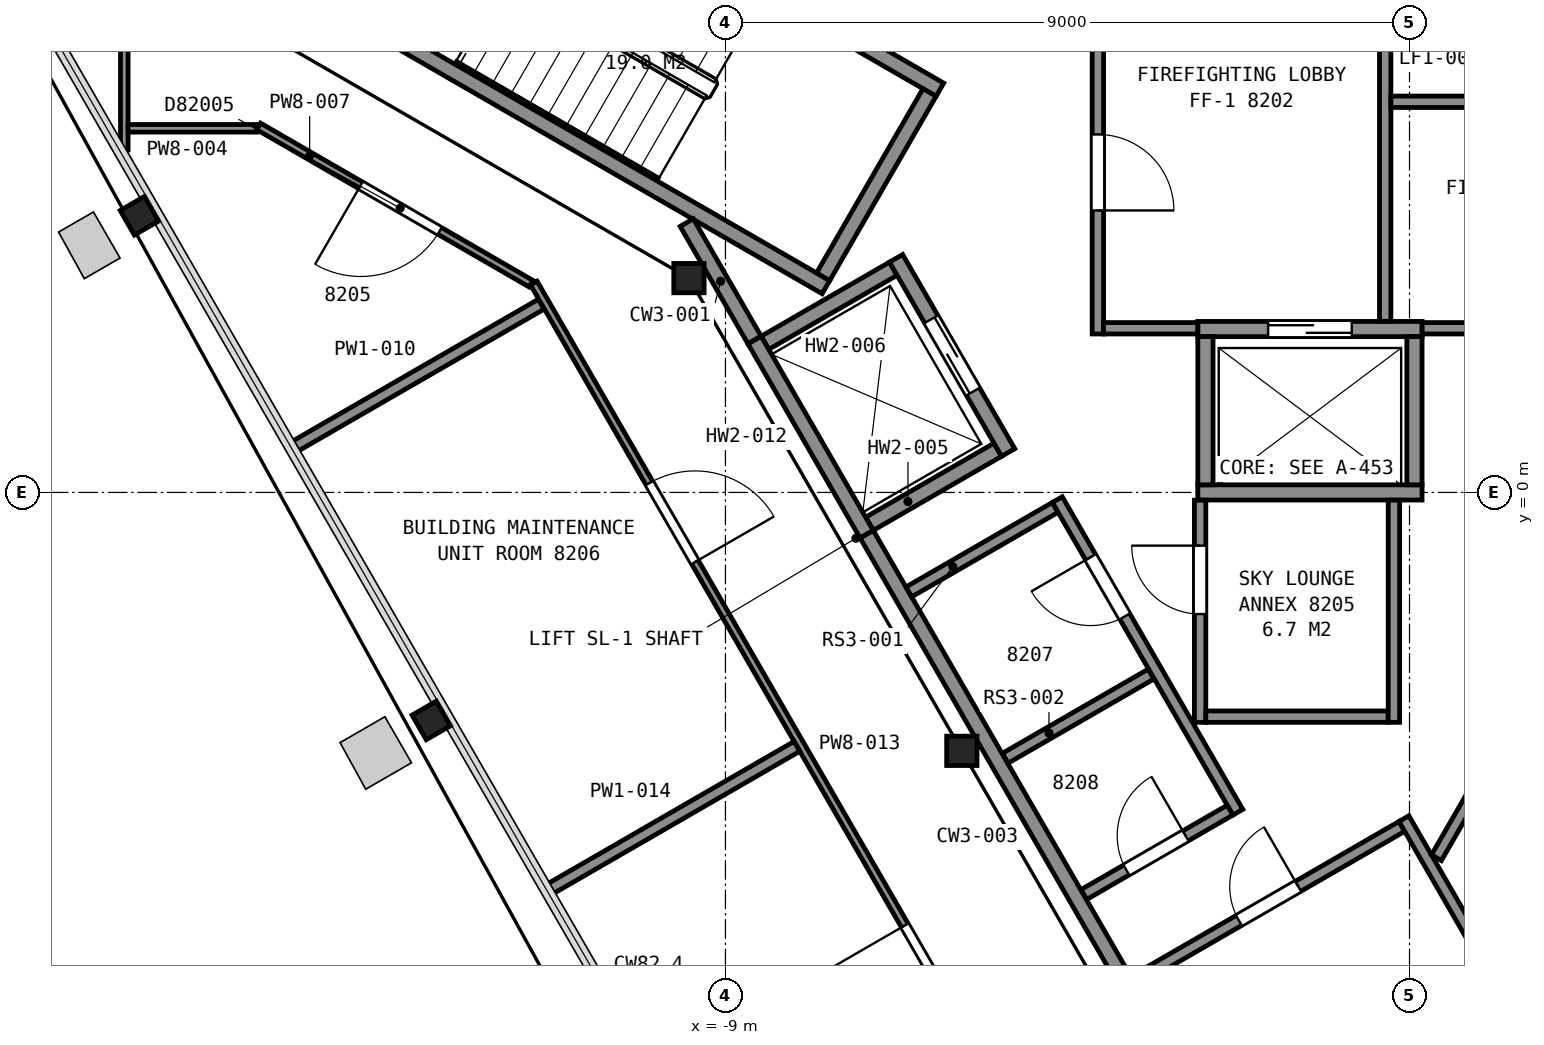
"""IFC4 building model, lengths in metres.
Left out: names, types, materials, properties, quantities, classifications, styles, units other than length and angle.
Written with IfcOpenShell. Run it as: python <this file> out.ifc"""

import sys

from ifc_helpers import new_model, si_unit, direction, frame, frame_2d, origin, origin_2d, place, context, subcontext, project, spatial, rectangle, i_section, extrude, element, fill, save


model = new_model("IFC4")
c1 = context("Model", 3, precision=1e-05, world=origin(), true_north=direction((0.0, 1.0)))
c2 = subcontext(c1, "Body", "Model", "MODEL_VIEW")
j1 = project(units=[si_unit("LENGTHUNIT", "METRE"), si_unit("PLANEANGLEUNIT", "RADIAN")], contexts=[c1])
p1 = place(None, origin())
s1 = spatial("IfcSite", under=j1, at=p1, CompositionType="ELEMENT")
p2 = place(p1, origin())
s2 = spatial("IfcBuilding", under=s1, at=p2, CompositionType="ELEMENT")
p3 = place(p2, frame((0.0, 0.0, 325.2)))
s3 = spatial("IfcBuildingStorey", under=s2, at=p3, CompositionType="ELEMENT", Elevation=325.2)
for number, where, z_axis, x_axis in (
    (1, (-16.71, 3.64, 0.0), (0.0, 0.0, 1.0), (-0.5, 0.866, 0.0)),
    (2, (-12.87, -3.0, 0.0), (0.0, 0.0, 1.0), (-0.5, 0.866, 0.0)),
):
    element("IfcColumn", number, at=place(p3, frame(where, z_axis=z_axis, x_axis=x_axis)), inside=s3, PredefinedType="COLUMN", context=c2, shape_type="SweptSolid", body=[
        extrude(i_section(OverallWidth=0.373, OverallDepth=0.368, WebThickness=0.015, FlangeThickness=0.024, FilletRadius=0.015, at=origin_2d()), origin(), (0.0, 0.0, 1.0), 4.2),
    ])
for number, where, z_axis, x_axis in (
    (3, (-9.48, 2.82, 0.0), (0.0, 0.0, 1.0), (1.0, 0.0, 0.0)),
    (4, (-5.89, -3.4, 0.0), (0.0, 0.0, 1.0), (1.0, 0.0, 0.0)),
):
    element("IfcColumn", number, at=place(p3, frame(where, z_axis=z_axis, x_axis=x_axis)), inside=s3, PredefinedType="COLUMN", context=c2, shape_type="SweptSolid", body=[
        extrude(i_section(OverallWidth=0.399, OverallDepth=0.386, WebThickness=0.021, FlangeThickness=0.033, FilletRadius=0.015, at=origin_2d()), origin(), (0.0, 0.0, 1.0), 4.2),
    ])
for number, where, z_axis, x_axis in (
    (5, (-7.678, 2.701, 0.0), (0.0, 0.0, 1.0), (-0.866, 0.5, 0.0)),
    (6, (-6.178, 5.299, 0.0), (0.0, 0.0, 1.0), (-0.866, 0.5, 0.0)),
):
    element("IfcWall", number, at=place(p3, frame(where, z_axis=z_axis, x_axis=x_axis)), inside=s3, PredefinedType="PARTITIONING", context=c2, shape_type="SweptSolid", body=[
        extrude(rectangle(XDim=7.2, YDim=0.2, at=frame_2d((3.6, 0.0))), origin(), (0.0, 0.0, 1.0), 3.95),
    ])
p4 = place(p3, frame((-6.315, 5.262, 0.0), z_axis=(0.0, 0.0, 1.0), x_axis=(-0.500049511043, -0.865996816683, 0.0)))
e7 = element("IfcWall", 7, at=p4, inside=s3, PredefinedType="PARTITIONING", context=c2, shape_type="SweptSolid", body=[
    extrude(rectangle(XDim=2.8, YDim=0.2, at=frame_2d((1.4, 0.0))), origin(), (0.0, 0.0, 1.0), 3.95),
])
p5 = place(p3, frame((-2.785, 0.0, 0.0), z_axis=(0.0, 0.0, 1.0), x_axis=(1.0, 0.0, 0.0)))
e8 = element("IfcWall", 8, at=p5, inside=s3, PredefinedType="PARTITIONING", context=c2, shape_type="SweptSolid", body=[
    extrude(rectangle(XDim=2.95, YDim=0.2, at=frame_2d((1.475, 0.0))), origin(), (0.0, 0.0, 1.0), 4.2),
])
p6 = place(p3, frame((-2.785, 2.15, 0.0), z_axis=(0.0, 0.0, 1.0), x_axis=(1.0, 0.0, 0.0)))
e9 = element("IfcWall", 9, at=p6, inside=s3, PredefinedType="PARTITIONING", context=c2, shape_type="SweptSolid", body=[
    extrude(rectangle(XDim=2.95, YDim=0.2, at=frame_2d((1.475, 0.0))), origin(), (0.0, 0.0, 1.0), 4.2),
])
p7 = place(p6, frame((0.925, 0.0, 0.0)))
e10 = element("IfcOpeningElement", 10, at=p7, cuts=e9, PredefinedType="OPENING", context=c2, shape_type="SweptSolid", body=[
    extrude(rectangle(XDim=1.1, YDim=2.1, at=frame_2d((0.55, 1.05))), frame((0.0, 0.11, 0.0), z_axis=(0.0, -1.0, 0.0), x_axis=(1.0, 0.0, 0.0)), (0.0, 0.0, 1.0), 0.22),
])
for number, where, z_axis, x_axis in (
    (11, (-7.105, -0.413, 0.0), (0.0, 0.0, 1.0), (0.866, 0.5, 0.0)),
    (12, (-8.48, 1.969, 0.0), (0.0, 0.0, 1.0), (0.866, 0.5, 0.0)),
    (13, (0.065, 0.1, 0.0), (0.0, 0.0, 1.0), (0.0, 1.0, 0.0)),
    (14, (-2.685, 0.1, 0.0), (0.0, 0.0, 1.0), (0.0, 1.0, 0.0)),
):
    element("IfcWall", number, at=place(p3, frame(where, z_axis=z_axis, x_axis=x_axis)), inside=s3, PredefinedType="PARTITIONING", context=c2, shape_type="SweptSolid", body=[
        extrude(rectangle(XDim=1.95, YDim=0.2, at=frame_2d((0.975, 0.0))), origin(), (0.0, 0.0, 1.0), 4.2),
    ])
p8 = place(p3, frame((-5.28, 0.525, 0.0), z_axis=(0.0, 0.0, 1.0), x_axis=(-0.500037662692, 0.866003658127, 0.0)))
e15 = element("IfcWall", 15, at=p8, inside=s3, PredefinedType="PARTITIONING", context=c2, shape_type="SweptSolid", body=[
    extrude(rectangle(XDim=2.95, YDim=0.2, at=frame_2d((1.475, 0.0))), origin(), (0.0, 0.0, 1.0), 4.2),
])
p9 = place(p8, frame((0.925, 0.0, 0.0)))
e16 = element("IfcOpeningElement", 16, at=p9, cuts=e15, PredefinedType="OPENING", context=c2, shape_type="SweptSolid", body=[
    extrude(rectangle(XDim=1.1, YDim=2.1, at=frame_2d((0.55, 1.05))), frame((0.0, 0.11, 0.0), z_axis=(0.0, -1.0, 0.0), x_axis=(1.0, 0.0, 0.0)), (0.0, 0.0, 1.0), 0.22),
])
p10 = place(p3, frame((-7.142, -0.55, 0.0), z_axis=(0.0, 0.0, 1.0), x_axis=(-0.49997559174, 0.866039495442, 0.0)))
e17 = element("IfcWall", 17, at=p10, inside=s3, PredefinedType="PARTITIONING", context=c2, shape_type="SweptSolid", body=[
    extrude(rectangle(XDim=2.95, YDim=0.2, at=frame_2d((1.475, 0.0))), origin(), (0.0, 0.0, 1.0), 4.2),
])
p11 = place(p3, frame((-9.509, 3.551, 0.0), z_axis=(0.0, 0.0, 1.0), x_axis=(0.499999136801, -0.866025902152, 0.0)))
e18 = element("IfcWall", 18, at=p11, inside=s3, PredefinedType="PARTITIONING", context=c2, shape_type="SweptSolid", body=[
    extrude(rectangle(XDim=1.782, YDim=0.2, at=frame_2d((0.891, 0.0))), origin(), (0.0, 0.0, 1.0), 3.95),
])
p12 = place(p3, frame((-7.141, -0.551, 0.0), z_axis=(0.0, 0.0, 1.0), x_axis=(0.499992795234, -0.866029563418, 0.0)))
e19 = element("IfcWall", 19, at=p12, inside=s3, PredefinedType="PARTITIONING", context=c2, shape_type="SweptSolid", body=[
    extrude(rectangle(XDim=9.198, YDim=0.2, at=frame_2d((4.599, 0.0))), origin(), (0.0, 0.0, 1.0), 3.95),
])
p13 = place(p3, frame((-6.587, -1.309, 0.0), z_axis=(0.0, 0.0, 1.0), x_axis=(0.865971748, 0.500092923031, 0.0)))
e20 = element("IfcWall", 20, at=p13, inside=s3, PredefinedType="PARTITIONING", context=c2, shape_type="SweptSolid", body=[
    extrude(rectangle(XDim=2.225, YDim=0.15, at=frame_2d((1.112, 0.0))), origin(), (0.0, 0.0, 1.0), 3.95),
])
p14 = place(p3, frame((-5.319, -3.498, 0.0), z_axis=(0.0, 0.0, 1.0), x_axis=(0.866044287926, 0.499967290281, 0.0)))
e21 = element("IfcWall", 21, at=p14, inside=s3, PredefinedType="PARTITIONING", context=c2, shape_type="SweptSolid", body=[
    extrude(rectangle(XDim=2.216, YDim=0.15, at=frame_2d((1.108, 0.0))), origin(), (0.0, 0.0, 1.0), 3.95),
])
p15 = place(p3, frame((-2.259, -4.208, 0.0), z_axis=(0.0, 0.0, 1.0), x_axis=(-0.49996417568, 0.866046085977, 0.0)))
e22 = element("IfcWall", 22, at=p15, inside=s3, PredefinedType="PARTITIONING", context=c2, shape_type="SweptSolid", body=[
    extrude(rectangle(XDim=4.75, YDim=0.15, at=frame_2d((2.375, 0.0))), origin(), (0.0, 0.0, 1.0), 3.95),
])
p16 = place(p15, frame((2.975, 0.0, 0.0)))
e23 = element("IfcOpeningElement", 23, at=p16, cuts=e22, PredefinedType="OPENING", context=c2, shape_type="SweptSolid", body=[
    extrude(rectangle(XDim=0.9, YDim=2.1, at=frame_2d((0.45, 1.05))), frame((0.0, 0.085, 0.0), z_axis=(0.0, -1.0, 0.0), x_axis=(1.0, 0.0, 0.0)), (0.0, 0.0, 1.0), 0.17),
])
p17 = place(p3, frame((-4.284, -5.291, 0.0), z_axis=(0.0, 0.0, 1.0), x_axis=(0.866090396616, 0.499887412213, 0.0)))
e24 = element("IfcWall", 24, at=p17, inside=s3, PredefinedType="PARTITIONING", context=c2, shape_type="SweptSolid", body=[
    extrude(rectangle(XDim=2.221, YDim=0.15, at=frame_2d((1.11, 0.0))), origin(), (0.0, 0.0, 1.0), 3.95),
])
p18 = place(p17, frame((0.645, 0.0, 0.0)))
e25 = element("IfcOpeningElement", 25, at=p18, cuts=e24, PredefinedType="OPENING", context=c2, shape_type="SweptSolid", body=[
    extrude(rectangle(XDim=0.9, YDim=2.1, at=frame_2d((0.45, 1.05))), frame((0.0, 0.085, 0.0), z_axis=(0.0, -1.0, 0.0), x_axis=(1.0, 0.0, 0.0)), (0.0, 0.0, 1.0), 0.17),
])
p19 = place(p3, frame((-4.1, 2.085, 0.0), z_axis=(0.0, 0.0, 1.0), x_axis=(0.0, 1.0, 0.0)))
e26 = element("IfcWall", 26, at=p19, inside=s3, PredefinedType="PARTITIONING", context=c2, shape_type="SweptSolid", body=[
    extrude(rectangle(XDim=4.23, YDim=0.15, at=frame_2d((2.115, 0.0))), origin(), (0.0, 0.0, 1.0), 3.95),
])
p20 = place(p19, frame((1.625, 0.0, 0.0)))
e27 = element("IfcOpeningElement", 27, at=p20, cuts=e26, PredefinedType="OPENING", context=c2, shape_type="SweptSolid", body=[
    extrude(rectangle(XDim=1.0, YDim=2.1, at=frame_2d((0.5, 1.05))), frame((0.0, 0.085, 0.0), z_axis=(0.0, -1.0, 0.0), x_axis=(1.0, 0.0, 0.0)), (0.0, 0.0, 1.0), 0.17),
])
p21 = place(p3, frame((-4.025, 2.16, 0.0), z_axis=(0.0, 0.0, 1.0), x_axis=(1.0, 0.0, 0.0)))
e28 = element("IfcWall", 28, at=p21, inside=s3, PredefinedType="PARTITIONING", context=c2, shape_type="SweptSolid", body=[
    extrude(rectangle(XDim=1.238, YDim=0.15, at=frame_2d((0.619, 0.0))), origin(), (0.0, 0.0, 1.0), 3.95),
])
p22 = place(p3, frame((-0.101, -4.395, 0.0), z_axis=(0.0, 0.0, 1.0), x_axis=(-0.866045745349, -0.499964765721, 0.0)))
e29 = element("IfcWall", 29, at=p22, inside=s3, PredefinedType="PARTITIONING", context=c2, shape_type="SweptSolid", body=[
    extrude(rectangle(XDim=4.07, YDim=0.15, at=frame_2d((2.035, 0.0))), origin(), (0.0, 0.0, 1.0), 3.95),
])
p23 = place(p22, frame((1.575, 0.0, 0.0)))
e30 = element("IfcOpeningElement", 30, at=p23, cuts=e29, PredefinedType="OPENING", context=c2, shape_type="SweptSolid", body=[
    extrude(rectangle(XDim=0.9, YDim=2.1, at=frame_2d((0.45, 1.05))), frame((0.0, 0.085, 0.0), z_axis=(0.0, -1.0, 0.0), x_axis=(1.0, 0.0, 0.0)), (0.0, 0.0, 1.0), 0.17),
])
p24 = place(p3, frame((-2.755, -0.102, 0.0), z_axis=(0.0, 0.0, 1.0), x_axis=(0.0, -1.0, 0.0)))
e31 = element("IfcWall", 31, at=p24, inside=s3, PredefinedType="PARTITIONING", context=c2, shape_type="SweptSolid", body=[
    extrude(rectangle(XDim=2.923, YDim=0.15, at=frame_2d((1.461, 0.0))), origin(), (0.0, 0.0, 1.0), 3.95),
])
p25 = place(p24, frame((0.598, 0.0, 0.0)))
e32 = element("IfcOpeningElement", 32, at=p25, cuts=e31, PredefinedType="OPENING", context=c2, shape_type="SweptSolid", body=[
    extrude(rectangle(XDim=0.9, YDim=2.1, at=frame_2d((0.45, 1.05))), frame((0.0, 0.085, 0.0), z_axis=(0.0, -1.0, 0.0), x_axis=(1.0, 0.0, 0.0)), (0.0, 0.0, 1.0), 0.17),
])
p26 = place(p3, frame((-2.68, -2.95, 0.0), z_axis=(0.0, 0.0, 1.0), x_axis=(1.0, 0.0, 0.0)))
e33 = element("IfcWall", 33, at=p26, inside=s3, PredefinedType="PARTITIONING", context=c2, shape_type="SweptSolid", body=[
    extrude(rectangle(XDim=2.4, YDim=0.15, at=frame_2d((1.2, 0.0))), origin(), (0.0, 0.0, 1.0), 3.95),
])
p27 = place(p3, frame((-0.32, 2.252, 0.0), z_axis=(0.0, 0.0, 1.0), x_axis=(0.0, 1.0, 0.0)))
e34 = element("IfcWall", 34, at=p27, inside=s3, PredefinedType="PARTITIONING", context=c2, shape_type="SweptSolid", body=[
    extrude(rectangle(XDim=4.063, YDim=0.15, at=frame_2d((2.031, 0.0))), origin(), (0.0, 0.0, 1.0), 3.95),
])
p28 = place(p3, frame((-0.245, 5.14, 0.0), z_axis=(0.0, 0.0, 1.0), x_axis=(1.0, 0.0, 0.0)))
e35 = element("IfcWall", 35, at=p28, inside=s3, PredefinedType="PARTITIONING", context=c2, shape_type="SweptSolid", body=[
    extrude(rectangle(XDim=5.11, YDim=0.15, at=frame_2d((2.555, 0.0))), origin(), (0.0, 0.0, 1.0), 3.95),
])
p29 = place(p28, frame((1.975, 0.0, 0.0)))
e36 = element("IfcOpeningElement", 36, at=p29, cuts=e35, PredefinedType="OPENING", context=c2, shape_type="SweptSolid", body=[
    extrude(rectangle(XDim=1.0, YDim=2.1, at=frame_2d((0.5, 1.05))), frame((0.0, 0.085, 0.0), z_axis=(0.0, -1.0, 0.0), x_axis=(1.0, 0.0, 0.0)), (0.0, 0.0, 1.0), 0.17),
])
p30 = place(p3, frame((-0.205, -3.025, 0.0), z_axis=(0.0, 0.0, 1.0), x_axis=(0.0, 1.0, 0.0)))
e37 = element("IfcWall", 37, at=p30, inside=s3, PredefinedType="PARTITIONING", context=c2, shape_type="SweptSolid", body=[
    extrude(rectangle(XDim=2.923, YDim=0.15, at=frame_2d((1.461, 0.0))), origin(), (0.0, 0.0, 1.0), 3.95),
])
p31 = place(p3, frame((-0.073, -4.292, 0.0), z_axis=(0.0, 0.0, 1.0), x_axis=(0.500004234368, -0.866022959057, 0.0)))
e38 = element("IfcWall", 38, at=p31, inside=s3, PredefinedType="PARTITIONING", context=c2, shape_type="SweptSolid", body=[
    extrude(rectangle(XDim=2.5, YDim=0.15, at=frame_2d((1.25, 0.0))), origin(), (0.0, 0.0, 1.0), 3.95),
])
p32 = place(p3, frame((0.167, 2.16, 0.0), z_axis=(0.0, 0.0, 1.0), x_axis=(1.0, 0.0, 0.0)))
e39 = element("IfcWall", 39, at=p32, inside=s3, PredefinedType="PARTITIONING", context=c2, shape_type="SweptSolid", body=[
    extrude(rectangle(XDim=1.356, YDim=0.15, at=frame_2d((0.678, 0.0))), origin(), (0.0, 0.0, 1.0), 3.95),
])
p33 = place(p3, frame((0.354, -4.806, 0.0), z_axis=(0.0, 0.0, 1.0), x_axis=(0.499804398801, 0.866138304741, 0.0)))
e40 = element("IfcWall", 40, at=p33, inside=s3, PredefinedType="PARTITIONING", context=c2, shape_type="SweptSolid", body=[
    extrude(rectangle(XDim=1.375, YDim=0.15, at=frame_2d((0.688, 0.0))), origin(), (0.0, 0.0, 1.0), 3.95),
])
p34 = place(p3, frame((-16.909, 4.507, 0.0), z_axis=(0.0, 0.0, 1.0), x_axis=(0.0, 1.0, 0.0)))
e41 = element("IfcWall", 41, at=p34, inside=s3, PredefinedType="PARTITIONING", context=c2, shape_type="SweptSolid", body=[
    extrude(rectangle(XDim=3.272, YDim=0.1, at=frame_2d((1.636, 0.0))), origin(), (0.0, 0.0, 1.0), 3.297),
])
p35 = place(p3, frame((-16.859, 4.791, 0.0), z_axis=(0.0, 0.0, 1.0), x_axis=(1.0, 0.0, 0.0)))
e42 = element("IfcWall", 42, at=p35, inside=s3, PredefinedType="PARTITIONING", context=c2, shape_type="SweptSolid", body=[
    extrude(rectangle(XDim=1.691, YDim=0.1, at=frame_2d((0.845, 0.0))), origin(), (0.0, 0.0, 1.0), 3.297),
])
p36 = place(p3, frame((-11.557, 2.746, 0.0), z_axis=(0.0, 0.0, 1.0), x_axis=(-0.866005840187, 0.500033883614, 0.0)))
e43 = element("IfcWall", 43, at=p36, inside=s3, PredefinedType="PARTITIONING", context=c2, shape_type="SweptSolid", body=[
    extrude(rectangle(XDim=4.139, YDim=0.1, at=frame_2d((2.07, 0.0))), origin(), (0.0, 0.0, 1.0), 3.297),
])
p37 = place(p36, frame((1.389, 0.0, 0.0)))
e44 = element("IfcOpeningElement", 44, at=p37, cuts=e43, PredefinedType="OPENING", context=c2, shape_type="SweptSolid", body=[
    extrude(rectangle(XDim=1.2, YDim=2.1, at=frame_2d((0.6, 1.05))), frame((0.0, 0.06, 0.0), z_axis=(0.0, -1.0, 0.0), x_axis=(1.0, 0.0, 0.0)), (0.0, 0.0, 1.0), 0.12),
])
p38 = place(p3, frame((-14.696, 0.588, 0.0), z_axis=(0.0, 0.0, 1.0), x_axis=(0.866115649152, 0.499843657852, 0.0)))
e45 = element("IfcWall", 45, at=p38, inside=s3, PredefinedType="PARTITIONING", context=c2, shape_type="SweptSolid", body=[
    extrude(rectangle(XDim=3.778, YDim=0.15, at=frame_2d((1.889, 0.0))), origin(), (0.0, 0.0, 1.0), 3.297),
])
p39 = place(p3, frame((-3.744, -10.714, 0.0), z_axis=(0.0, 0.0, 1.0), x_axis=(-0.500044034969, 0.86599997869, 0.0)))
e46 = element("IfcWall", 46, at=p39, inside=s3, PredefinedType="PARTITIONING", context=c2, shape_type="SweptSolid", body=[
    extrude(rectangle(XDim=15.553, YDim=0.1, at=frame_2d((7.776, 0.0))), origin(), (0.0, 0.0, 1.0), 3.297),
])
p40 = place(p39, frame((11.314, 0.0, 0.0)))
e47 = element("IfcOpeningElement", 47, at=p40, cuts=e46, PredefinedType="OPENING", context=c2, shape_type="SweptSolid", body=[
    extrude(rectangle(XDim=1.2, YDim=2.1, at=frame_2d((0.6, 1.05))), frame((0.0, 0.06, 0.0), z_axis=(0.0, -1.0, 0.0), x_axis=(1.0, 0.0, 0.0)), (0.0, 0.0, 1.0), 0.12),
])
p41 = place(p39, frame((4.593, 0.0, 0.0)))
e48 = element("IfcOpeningElement", 48, at=p41, cuts=e46, PredefinedType="OPENING", context=c2, shape_type="SweptSolid", body=[
    extrude(rectangle(XDim=1.2, YDim=2.1, at=frame_2d((0.6, 1.05))), frame((0.0, 0.06, 0.0), z_axis=(0.0, -1.0, 0.0), x_axis=(1.0, 0.0, 0.0)), (0.0, 0.0, 1.0), 0.12),
])
p42 = place(p3, frame((-11.335, -5.233, 0.0), z_axis=(0.0, 0.0, 1.0), x_axis=(0.865922223361, 0.500178671167, 0.0)))
e49 = element("IfcWall", 49, at=p42, inside=s3, PredefinedType="PARTITIONING", context=c2, shape_type="SweptSolid", body=[
    extrude(rectangle(XDim=3.783, YDim=0.15, at=frame_2d((1.891, 0.0))), origin(), (0.0, 0.0, 1.0), 3.297),
])
p43 = place(p7, origin())
e50 = element("IfcDoor", 50, at=p43, inside=s3, OperationType="SLIDING_TO_LEFT", PredefinedType="DOOR", context=c2, shape_type="SweptSolid", body=[
    extrude(rectangle(XDim=1.1, YDim=2.1, at=frame_2d((0.55, 1.05))), frame((0.0, 0.025, 0.0), z_axis=(0.0, -1.0, 0.0), x_axis=(1.0, 0.0, 0.0)), (0.0, 0.0, 1.0), 0.05),
])
fill(e10, e50)
p44 = place(p9, origin())
e51 = element("IfcDoor", 51, at=p44, inside=s3, OperationType="SLIDING_TO_LEFT", PredefinedType="DOOR", context=c2, shape_type="SweptSolid", body=[
    extrude(rectangle(XDim=1.1, YDim=2.1, at=frame_2d((0.55, 1.05))), frame((0.0, 0.025, 0.0), z_axis=(0.0, -1.0, 0.0), x_axis=(1.0, 0.0, 0.0)), (0.0, 0.0, 1.0), 0.05),
])
fill(e16, e51)
p45 = place(p16, origin())
e52 = element("IfcDoor", 52, at=p45, inside=s3, OperationType="SINGLE_SWING_RIGHT", PredefinedType="DOOR", context=c2, shape_type="SweptSolid", body=[
    extrude(rectangle(XDim=0.9, YDim=2.1, at=frame_2d((0.45, 1.05))), frame((0.0, 0.025, 0.0), z_axis=(0.0, -1.0, 0.0), x_axis=(1.0, 0.0, 0.0)), (0.0, 0.0, 1.0), 0.05),
])
fill(e23, e52)
p46 = place(p18, origin())
e53 = element("IfcDoor", 53, at=p46, inside=s3, OperationType="SINGLE_SWING_RIGHT", PredefinedType="DOOR", context=c2, shape_type="SweptSolid", body=[
    extrude(rectangle(XDim=0.9, YDim=2.1, at=frame_2d((0.45, 1.05))), frame((0.0, 0.025, 0.0), z_axis=(0.0, -1.0, 0.0), x_axis=(1.0, 0.0, 0.0)), (0.0, 0.0, 1.0), 0.05),
])
fill(e25, e53)
p47 = place(p20, origin())
e54 = element("IfcDoor", 54, at=p47, inside=s3, OperationType="SINGLE_SWING_LEFT", PredefinedType="DOOR", context=c2, shape_type="SweptSolid", body=[
    extrude(rectangle(XDim=1.0, YDim=2.1, at=frame_2d((0.5, 1.05))), frame((0.0, 0.025, 0.0), z_axis=(0.0, -1.0, 0.0), x_axis=(1.0, 0.0, 0.0)), (0.0, 0.0, 1.0), 0.05),
])
fill(e27, e54)
p48 = place(p23, origin())
e55 = element("IfcDoor", 55, at=p48, inside=s3, OperationType="SINGLE_SWING_LEFT", PredefinedType="DOOR", context=c2, shape_type="SweptSolid", body=[
    extrude(rectangle(XDim=0.9, YDim=2.1, at=frame_2d((0.45, 1.05))), frame((0.0, 0.025, 0.0), z_axis=(0.0, -1.0, 0.0), x_axis=(1.0, 0.0, 0.0)), (0.0, 0.0, 1.0), 0.05),
])
fill(e30, e55)
p49 = place(p25, origin())
e56 = element("IfcDoor", 56, at=p49, inside=s3, OperationType="SINGLE_SWING_LEFT", PredefinedType="DOOR", context=c2, shape_type="SweptSolid", body=[
    extrude(rectangle(XDim=0.9, YDim=2.1, at=frame_2d((0.45, 1.05))), frame((0.0, 0.025, 0.0), z_axis=(0.0, -1.0, 0.0), x_axis=(1.0, 0.0, 0.0)), (0.0, 0.0, 1.0), 0.05),
])
fill(e32, e56)
p50 = place(p37, origin())
e57 = element("IfcDoor", 57, at=p50, inside=s3, OperationType="SINGLE_SWING_RIGHT", PredefinedType="DOOR", context=c2, shape_type="SweptSolid", body=[
    extrude(rectangle(XDim=1.2, YDim=2.1, at=frame_2d((0.6, 1.05))), frame((0.0, 0.025, 0.0), z_axis=(0.0, -1.0, 0.0), x_axis=(1.0, 0.0, 0.0)), (0.0, 0.0, 1.0), 0.05),
])
fill(e44, e57)
p51 = place(p40, origin())
e58 = element("IfcDoor", 58, at=p51, inside=s3, OperationType="SINGLE_SWING_LEFT", PredefinedType="DOOR", context=c2, shape_type="SweptSolid", body=[
    extrude(rectangle(XDim=1.2, YDim=2.1, at=frame_2d((0.6, 1.05))), frame((0.0, 0.025, 0.0), z_axis=(0.0, -1.0, 0.0), x_axis=(1.0, 0.0, 0.0)), (0.0, 0.0, 1.0), 0.05),
])
fill(e47, e58)
p52 = place(p41, origin())
e59 = element("IfcDoor", 59, at=p52, inside=s3, OperationType="SINGLE_SWING_RIGHT", PredefinedType="DOOR", context=c2, shape_type="SweptSolid", body=[
    extrude(rectangle(XDim=1.2, YDim=2.1, at=frame_2d((0.6, 1.05))), frame((0.0, 0.025, 0.0), z_axis=(0.0, -1.0, 0.0), x_axis=(1.0, 0.0, 0.0)), (0.0, 0.0, 1.0), 0.05),
])
fill(e48, e59)
save(model, sys.argv[1])
